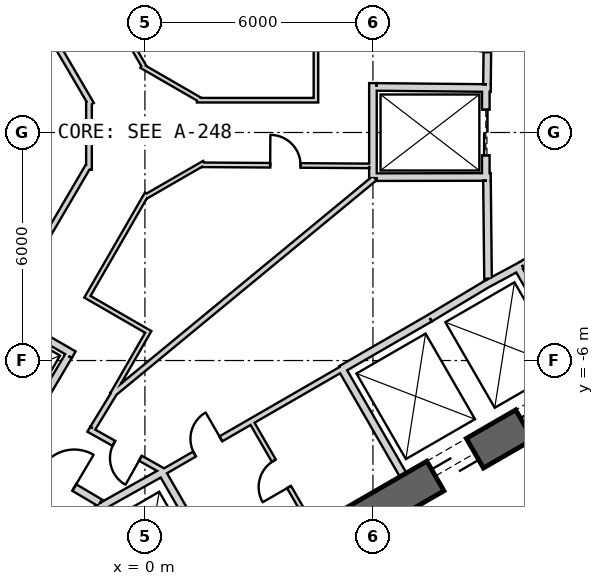
"""IFC4 building model, lengths in metres.
Left out: names, types, materials, properties, quantities, classifications, styles, units other than length and angle.
Written with IfcOpenShell. Run it as: python <this file> out.ifc"""

import sys

from ifc_helpers import new_model, si_unit, direction, frame, frame_2d, origin, place, context, subcontext, project, spatial, rectangle, extrude, element, fill, save


model = new_model("IFC4")
c1 = context("Model", 3, precision=1e-05, world=origin(), true_north=direction((0.0, 1.0)))
c2 = subcontext(c1, "Body", "Model", "MODEL_VIEW")
j1 = project(units=[si_unit("LENGTHUNIT", "METRE"), si_unit("PLANEANGLEUNIT", "RADIAN")], contexts=[c1])
p1 = place(None, origin())
s1 = spatial("IfcSite", under=j1, at=p1, CompositionType="ELEMENT")
p2 = place(p1, origin())
s2 = spatial("IfcBuilding", under=s1, at=p2, CompositionType="ELEMENT")
p3 = place(p2, frame((0.0, 0.0, 398.3)))
s3 = spatial("IfcBuildingStorey", under=s2, at=p3, CompositionType="ELEMENT", Elevation=398.3)
p4 = place(p3, frame((19.475, 2.208, 0.0), z_axis=(0.0, 0.0, 1.0), x_axis=(-0.866028369851, 0.499994862586, 0.0)))
e1 = element("IfcWall", 1, at=p4, inside=s3, PredefinedType="SHEAR", context=c2, shape_type="SweptSolid", body=[
    extrude(rectangle(XDim=31.523, YDim=0.9, at=frame_2d((15.762, 0.0))), origin(), (0.0, 0.0, 1.0), 6.5),
])
p5 = place(p4, frame((3.612, 0.0, 0.0)))
e2 = element("IfcOpeningElement", 2, at=p5, cuts=e1, PredefinedType="OPENING", context=c2, shape_type="SweptSolid", body=[
    extrude(rectangle(XDim=1.2, YDim=2.4, at=frame_2d((0.6, 1.2))), frame((0.0, 0.46, 0.0), z_axis=(0.0, -1.0, 0.0), x_axis=(1.0, 0.0, 0.0)), (0.0, 0.0, 1.0), 0.92),
])
p6 = place(p4, frame((26.712, 0.0, 0.0)))
e3 = element("IfcOpeningElement", 3, at=p6, cuts=e1, PredefinedType="OPENING", context=c2, shape_type="SweptSolid", body=[
    extrude(rectangle(XDim=1.2, YDim=2.4, at=frame_2d((0.6, 1.2))), frame((0.0, 0.46, 0.0), z_axis=(0.0, -1.0, 0.0), x_axis=(1.0, 0.0, 0.0)), (0.0, 0.0, 1.0), 0.92),
])
p7 = place(p3, frame((-7.825, -17.97, 0.0), z_axis=(0.0, 0.0, 1.0), x_axis=(0.866028369851, 0.499994862586, 0.0)))
e4 = element("IfcWall", 4, at=p7, inside=s3, PredefinedType="SHEAR", context=c2, shape_type="SweptSolid", body=[
    extrude(rectangle(XDim=31.523, YDim=0.9, at=frame_2d((15.762, 0.0))), origin(), (0.0, 0.0, 1.0), 6.5),
])
p8 = place(p7, frame((7.062, 0.0, 0.0)))
e5 = element("IfcOpeningElement", 5, at=p8, cuts=e4, PredefinedType="OPENING", context=c2, shape_type="SweptSolid", body=[
    extrude(rectangle(XDim=1.2, YDim=2.4, at=frame_2d((0.6, 1.2))), frame((0.0, 0.46, 0.0), z_axis=(0.0, -1.0, 0.0), x_axis=(1.0, 0.0, 0.0)), (0.0, 0.0, 1.0), 0.92),
])
p9 = place(p7, frame((9.762, 0.0, 0.0)))
e6 = element("IfcOpeningElement", 6, at=p9, cuts=e4, PredefinedType="OPENING", context=c2, shape_type="SweptSolid", body=[
    extrude(rectangle(XDim=1.2, YDim=2.4, at=frame_2d((0.6, 1.2))), frame((0.0, 0.46, 0.0), z_axis=(0.0, -1.0, 0.0), x_axis=(1.0, 0.0, 0.0)), (0.0, 0.0, 1.0), 0.92),
])
p10 = place(p7, frame((17.862, 0.0, 0.0)))
e7 = element("IfcOpeningElement", 7, at=p10, cuts=e4, PredefinedType="OPENING", context=c2, shape_type="SweptSolid", body=[
    extrude(rectangle(XDim=1.2, YDim=2.4, at=frame_2d((0.6, 1.2))), frame((0.0, 0.46, 0.0), z_axis=(0.0, -1.0, 0.0), x_axis=(1.0, 0.0, 0.0)), (0.0, 0.0, 1.0), 0.92),
])
p11 = place(p7, frame((20.562, 0.0, 0.0)))
e8 = element("IfcOpeningElement", 8, at=p11, cuts=e4, PredefinedType="OPENING", context=c2, shape_type="SweptSolid", body=[
    extrude(rectangle(XDim=1.2, YDim=2.4, at=frame_2d((0.6, 1.2))), frame((0.0, 0.46, 0.0), z_axis=(0.0, -1.0, 0.0), x_axis=(1.0, 0.0, 0.0)), (0.0, 0.0, 1.0), 0.92),
])
p12 = place(p7, frame((26.712, 0.0, 0.0)))
e9 = element("IfcOpeningElement", 9, at=p12, cuts=e4, PredefinedType="OPENING", context=c2, shape_type="SweptSolid", body=[
    extrude(rectangle(XDim=1.2, YDim=2.4, at=frame_2d((0.6, 1.2))), frame((0.0, 0.46, 0.0), z_axis=(0.0, -1.0, 0.0), x_axis=(1.0, 0.0, 0.0)), (0.0, 0.0, 1.0), 0.92),
])
p13 = place(p7, frame((3.612, 0.0, 0.0)))
e10 = element("IfcOpeningElement", 10, at=p13, cuts=e4, PredefinedType="OPENING", context=c2, shape_type="SweptSolid", body=[
    extrude(rectangle(XDim=1.2, YDim=2.4, at=frame_2d((0.6, 1.2))), frame((0.0, 0.46, 0.0), z_axis=(0.0, -1.0, 0.0), x_axis=(1.0, 0.0, 0.0)), (0.0, 0.0, 1.0), 0.92),
])
p14 = place(p3, frame((0.442, -8.925, 0.0), z_axis=(0.0, 0.0, 1.0), x_axis=(0.499984717929, -0.866034226713, 0.0)))
e11 = element("IfcWall", 11, at=p14, inside=s3, PredefinedType="PLUMBINGWALL", context=c2, shape_type="SweptSolid", body=[
    extrude(rectangle(XDim=3.25, YDim=0.2, at=frame_2d((1.625, 0.0))), origin(), (0.0, 0.0, 1.0), 6.2),
])
p15 = place(p3, frame((-1.024, -9.771, 0.0), z_axis=(0.0, 0.0, 1.0), x_axis=(-0.850348075135, -0.526220629693, 0.0)))
e12 = element("IfcWall", 12, at=p15, inside=s3, PredefinedType="PLUMBINGWALL", context=c2, shape_type="SweptSolid", body=[
    extrude(rectangle(XDim=0.878, YDim=0.2, at=frame_2d((0.439, 0.0))), origin(), (0.0, 0.0, 1.0), 6.2),
])
p16 = place(p3, frame((-1.13, -9.832, 0.0), z_axis=(0.0, 0.0, 1.0), x_axis=(0.871988740738, 0.489525929882, 0.0)))
e13 = element("IfcWall", 13, at=p16, inside=s3, PredefinedType="PLUMBINGWALL", context=c2, shape_type="SweptSolid", body=[
    extrude(rectangle(XDim=1.845, YDim=0.2, at=frame_2d((0.922, 0.0))), origin(), (0.0, 0.0, 1.0), 6.2),
])
p17 = place(p3, frame((6.795, -9.01, 0.0), z_axis=(0.0, 0.0, 1.0), x_axis=(-0.499984717929, 0.866034226713, 0.0)))
e14 = element("IfcWall", 14, at=p17, inside=s3, PredefinedType="PLUMBINGWALL", context=c2, shape_type="SweptSolid", body=[
    extrude(rectangle(XDim=3.25, YDim=0.2, at=frame_2d((1.625, 0.0))), origin(), (0.0, 0.0, 1.0), 6.2),
])
p18 = place(p3, frame((5.159, -6.236, 0.0), z_axis=(0.0, 0.0, 1.0), x_axis=(0.866036505625, 0.499980770555, 0.0)))
e15 = element("IfcWall", 15, at=p18, inside=s3, PredefinedType="PLUMBINGWALL", context=c2, shape_type="SweptSolid", body=[
    extrude(rectangle(XDim=2.7, YDim=0.2, at=frame_2d((1.35, 0.0))), origin(), (0.0, 0.0, 1.0), 6.2),
])
p19 = place(p3, frame((9.795, -3.525, 0.0), z_axis=(0.0, 0.0, 1.0), x_axis=(0.499984717929, -0.866034226713, 0.0)))
e16 = element("IfcWall", 16, at=p19, inside=s3, PredefinedType="PLUMBINGWALL", context=c2, shape_type="SweptSolid", body=[
    extrude(rectangle(XDim=3.25, YDim=0.2, at=frame_2d((1.625, 0.0))), origin(), (0.0, 0.0, 1.0), 6.2),
])
p20 = place(p3, frame((8.974, -3.999, 0.0), z_axis=(0.0, 0.0, 1.0), x_axis=(0.880907015104, 0.473289373154, 0.0)))
e17 = element("IfcWall", 17, at=p20, inside=s3, PredefinedType="PLUMBINGWALL", context=c2, shape_type="SweptSolid", body=[
    extrude(rectangle(XDim=1.078, YDim=0.2, at=frame_2d((0.539, 0.0))), origin(), (0.0, 0.0, 1.0), 6.2),
])
p21 = place(p3, frame((7.497, -4.886, 0.0), z_axis=(0.0, 0.0, 1.0), x_axis=(0.857516281273, 0.51445682749, 0.0)))
e18 = element("IfcWall", 18, at=p21, inside=s3, PredefinedType="PLUMBINGWALL", context=c2, shape_type="SweptSolid", body=[
    extrude(rectangle(XDim=1.845, YDim=0.2, at=frame_2d((0.922, 0.0))), origin(), (0.0, 0.0, 1.0), 6.2),
])
p22 = place(p3, frame((8.97, 1.2, 0.0), z_axis=(0.0, 0.0, 1.0), x_axis=(0.0, -1.0, 0.0)))
e19 = element("IfcWall", 19, at=p22, inside=s3, PredefinedType="PLUMBINGWALL", context=c2, shape_type="SweptSolid", body=[
    extrude(rectangle(XDim=2.4, YDim=0.2, at=frame_2d((1.2, 0.0))), origin(), (0.0, 0.0, 1.0), 6.2),
])
p23 = place(p22, frame((0.6, 0.0, 0.0)))
e20 = element("IfcOpeningElement", 20, at=p23, cuts=e19, PredefinedType="OPENING", context=c2, shape_type="SweptSolid", body=[
    extrude(rectangle(XDim=1.2, YDim=2.4, at=frame_2d((0.6, 1.2))), frame((0.0, 0.11, 0.0), z_axis=(0.0, -1.0, 0.0), x_axis=(1.0, 0.0, 0.0)), (0.0, 0.0, 1.0), 0.22),
])
p24 = place(p3, frame((9.1, -1.17, 0.0), z_axis=(0.0, 0.0, 1.0), x_axis=(-0.999998675455, -0.001627602011, 0.0)))
e21 = element("IfcWall", 21, at=p24, inside=s3, PredefinedType="PLUMBINGWALL", context=c2, shape_type="SweptSolid", body=[
    extrude(rectangle(XDim=3.0, YDim=0.2, at=frame_2d((1.5, 0.0))), origin(), (0.0, 0.0, 1.0), 6.2),
])
p25 = place(p3, frame((6.0, -1.2, 0.0), z_axis=(0.0, 0.0, 1.0), x_axis=(0.0, 1.0, 0.0)))
e22 = element("IfcWall", 22, at=p25, inside=s3, PredefinedType="PLUMBINGWALL", context=c2, shape_type="SweptSolid", body=[
    extrude(rectangle(XDim=2.5, YDim=0.2, at=frame_2d((1.25, 0.0))), origin(), (0.0, 0.0, 1.0), 6.2),
])
p26 = place(p3, frame((9.1, 1.169, 0.0), z_axis=(0.0, 0.0, 1.0), x_axis=(-0.99994990606, 0.010009264196, 0.0)))
e23 = element("IfcWall", 23, at=p26, inside=s3, PredefinedType="PLUMBINGWALL", context=c2, shape_type="SweptSolid", body=[
    extrude(rectangle(XDim=3.0, YDim=0.2, at=frame_2d((1.5, 0.0))), origin(), (0.0, 0.0, 1.0), 6.2),
])
p27 = place(p3, frame((-3.953, -4.646, 0.0), z_axis=(0.0, 0.0, 1.0), x_axis=(0.866024647952, -0.500001309137, 0.0)))
e24 = element("IfcWall", 24, at=p27, inside=s3, PredefinedType="PLUMBINGWALL", context=c2, shape_type="SweptSolid", body=[
    extrude(rectangle(XDim=2.4, YDim=0.2, at=frame_2d((1.2, 0.0))), origin(), (0.0, 0.0, 1.0), 6.2),
])
p28 = place(p3, frame((-2.012, -5.882, 0.0), z_axis=(0.0, 0.0, 1.0), x_axis=(-0.508619639323, -0.860991325447, 0.0)))
e25 = element("IfcWall", 25, at=p28, inside=s3, PredefinedType="PLUMBINGWALL", context=c2, shape_type="SweptSolid", body=[
    extrude(rectangle(XDim=3.0, YDim=0.2, at=frame_2d((1.5, 0.0))), origin(), (0.0, 0.0, 1.0), 6.2),
])
p29 = place(p3, frame((4.405, -10.389, 0.0), z_axis=(0.0, 0.0, 1.0), x_axis=(-0.500017246033, 0.866015446554, 0.0)))
e26 = element("IfcWall", 26, at=p29, inside=s3, PredefinedType="PARTITIONING", context=c2, shape_type="SweptSolid", body=[
    extrude(rectangle(XDim=3.25, YDim=0.12, at=frame_2d((1.625, 0.0))), origin(), (0.0, 0.0, 1.0), 6.2),
])
p30 = place(p29, frame((1.225, 0.0, 0.0)))
e27 = element("IfcOpeningElement", 27, at=p30, cuts=e26, PredefinedType="OPENING", context=c2, shape_type="SweptSolid", body=[
    extrude(rectangle(XDim=0.8, YDim=2.1, at=frame_2d((0.4, 1.05))), frame((0.0, 0.07, 0.0), z_axis=(0.0, -1.0, 0.0), x_axis=(1.0, 0.0, 0.0)), (0.0, 0.0, 1.0), 0.14),
])
p31 = place(p3, frame((0.483, -8.936, 0.0), z_axis=(0.0, 0.0, 1.0), x_axis=(0.866028230842, 0.499995103361, 0.0)))
e28 = element("IfcWall", 28, at=p31, inside=s3, PredefinedType="PLUMBINGWALL", context=c2, shape_type="SweptSolid", body=[
    extrude(rectangle(XDim=5.4, YDim=0.15, at=frame_2d((2.7, 0.0))), origin(), (0.0, 0.0, 1.0), 6.2),
])
p32 = place(p31, frame((0.95, 0.0, 0.0)))
e29 = element("IfcOpeningElement", 29, at=p32, cuts=e28, PredefinedType="OPENING", context=c2, shape_type="SweptSolid", body=[
    extrude(rectangle(XDim=0.8, YDim=2.1, at=frame_2d((0.4, 1.05))), frame((0.0, 0.085, 0.0), z_axis=(0.0, -1.0, 0.0), x_axis=(1.0, 0.0, 0.0)), (0.0, 0.0, 1.0), 0.17),
])
p33 = place(p3, frame((12.245, -2.109, 0.0), z_axis=(0.0, 0.0, 1.0), x_axis=(-0.860414880418, -0.509594185166, 0.0)))
e30 = element("IfcWall", 30, at=p33, inside=s3, PredefinedType="PARTITIONING", context=c2, shape_type="SweptSolid", body=[
    extrude(rectangle(XDim=2.7, YDim=0.2, at=frame_2d((1.35, 0.0))), origin(), (0.0, 0.0, 1.0), 6.2),
])
p34 = place(p3, frame((9.029, -3.851, 0.0), z_axis=(0.0, 0.0, 1.0), x_axis=(-0.010784614026, 0.999941844359, 0.0)))
e31 = element("IfcWall", 31, at=p34, inside=s3, PredefinedType="PARTITIONING", context=c2, shape_type="SweptSolid", body=[
    extrude(rectangle(XDim=2.581, YDim=0.2, at=frame_2d((1.291, 0.0))), origin(), (0.0, 0.0, 1.0), 6.2),
])
p35 = place(p3, frame((9.001, 1.27, 0.0), z_axis=(0.0, 0.0, 1.0), x_axis=(0.010723968736, 0.999942496594, 0.0)))
e32 = element("IfcWall", 32, at=p35, inside=s3, PredefinedType="PARTITIONING", context=c2, shape_type="SweptSolid", body=[
    extrude(rectangle(XDim=2.709, YDim=0.2, at=frame_2d((1.354, 0.0))), origin(), (0.0, 0.0, 1.0), 6.2),
])
p36 = place(p35, frame((0.848, 0.0, 0.0)))
e33 = element("IfcOpeningElement", 33, at=p36, cuts=e32, PredefinedType="OPENING", context=c2, shape_type="SweptSolid", body=[
    extrude(rectangle(XDim=1.0, YDim=2.1, at=frame_2d((0.5, 1.05))), frame((0.0, 0.11, 0.0), z_axis=(0.0, -1.0, 0.0), x_axis=(1.0, 0.0, 0.0)), (0.0, 0.0, 1.0), 0.22),
])
p37 = place(p3, frame((-3.401, -8.43, 0.0), z_axis=(0.0, 0.0, 1.0), x_axis=(0.860598681535, -0.509283721849, 0.0)))
e34 = element("IfcWall", 34, at=p37, inside=s3, PredefinedType="PARTITIONING", context=c2, shape_type="SweptSolid", body=[
    extrude(rectangle(XDim=2.581, YDim=0.2, at=frame_2d((1.291, 0.0))), origin(), (0.0, 0.0, 1.0), 6.2),
])
p38 = place(p37, frame((0.791, 0.0, 0.0)))
e35 = element("IfcOpeningElement", 35, at=p38, cuts=e34, PredefinedType="OPENING", context=c2, shape_type="SweptSolid", body=[
    extrude(rectangle(XDim=1.0, YDim=2.1, at=frame_2d((0.5, 1.05))), frame((0.0, 0.11, 0.0), z_axis=(0.0, -1.0, 0.0), x_axis=(1.0, 0.0, 0.0)), (0.0, 0.0, 1.0), 0.22),
])
p39 = place(p3, frame((-1.407, 0.74, 0.0), z_axis=(0.0, 0.0, 1.0), x_axis=(-0.505642484845, 0.862743112125, 0.0)))
e36 = element("IfcWall", 36, at=p39, inside=s3, PredefinedType="PLUMBINGWALL", context=c2, shape_type="SweptSolid", body=[
    extrude(rectangle(XDim=4.556, YDim=0.15, at=frame_2d((2.278, 0.0))), origin(), (0.0, 0.0, 1.0), 6.2),
])
p40 = place(p39, frame((1.942, 0.0, 0.0)))
e37 = element("IfcOpeningElement", 37, at=p40, cuts=e36, PredefinedType="OPENING", context=c2, shape_type="SweptSolid", body=[
    extrude(rectangle(XDim=0.8, YDim=2.1, at=frame_2d((0.4, 1.05))), frame((0.0, 0.085, 0.0), z_axis=(0.0, -1.0, 0.0), x_axis=(1.0, 0.0, 0.0)), (0.0, 0.0, 1.0), 0.17),
])
p41 = place(p3, frame((-1.472, -0.978, 0.0), z_axis=(0.0, 0.0, 1.0), x_axis=(0.0, 1.0, 0.0)))
e38 = element("IfcWall", 38, at=p41, inside=s3, PredefinedType="PLUMBINGWALL", context=c2, shape_type="SweptSolid", body=[
    extrude(rectangle(XDim=1.804, YDim=0.15, at=frame_2d((0.902, 0.0))), origin(), (0.0, 0.0, 1.0), 6.2),
])
p42 = place(p3, frame((-3.711, -4.67, 0.0), z_axis=(0.0, 0.0, 1.0), x_axis=(0.505648368764, 0.86273966361, 0.0)))
e39 = element("IfcWall", 39, at=p42, inside=s3, PredefinedType="PLUMBINGWALL", context=c2, shape_type="SweptSolid", body=[
    extrude(rectangle(XDim=4.404, YDim=0.15, at=frame_2d((2.202, 0.0))), origin(), (0.0, 0.0, 1.0), 6.2),
])
p43 = place(p3, frame((6.046, -1.2, 0.0), z_axis=(0.0, 0.0, 1.0), x_axis=(-0.771489624803, -0.636241902755, 0.0)))
e40 = element("IfcWall", 40, at=p43, inside=s3, PredefinedType="PLUMBINGWALL", context=c2, shape_type="SweptSolid", body=[
    extrude(rectangle(XDim=8.961, YDim=0.15, at=frame_2d((4.48, 0.0))), origin(), (0.0, 0.0, 1.0), 6.2),
])
p44 = place(p3, frame((-1.477, -7.808, 0.0), z_axis=(0.0, 0.0, 1.0), x_axis=(0.871822901869, -0.48982122022, 0.0)))
e41 = element("IfcWall", 41, at=p44, inside=s3, PredefinedType="PLUMBINGWALL", context=c2, shape_type="SweptSolid", body=[
    extrude(rectangle(XDim=2.24, YDim=0.15, at=frame_2d((1.12, 0.0))), origin(), (0.0, 0.0, 1.0), 6.2),
])
p45 = place(p44, frame((0.757, 0.0, 0.0)))
e42 = element("IfcOpeningElement", 42, at=p45, cuts=e41, PredefinedType="OPENING", context=c2, shape_type="SweptSolid", body=[
    extrude(rectangle(XDim=0.8, YDim=2.1, at=frame_2d((0.4, 1.05))), frame((0.0, 0.085, 0.0), z_axis=(0.0, -1.0, 0.0), x_axis=(1.0, 0.0, 0.0)), (0.0, 0.0, 1.0), 0.17),
])
p46 = place(p3, frame((-0.787, -6.821, 0.0), z_axis=(0.0, 0.0, 1.0), x_axis=(-0.520993333897, -0.853560745369, 0.0)))
e43 = element("IfcWall", 43, at=p46, inside=s3, PredefinedType="PLUMBINGWALL", context=c2, shape_type="SweptSolid", body=[
    extrude(rectangle(XDim=1.125, YDim=0.15, at=frame_2d((0.562, 0.0))), origin(), (0.0, 0.0, 1.0), 6.2),
])
p47 = place(p3, frame((0.118, -5.195, 0.0), z_axis=(0.0, 0.0, 1.0), x_axis=(-0.499969367985, -0.866043088465, 0.0)))
e44 = element("IfcWall", 44, at=p47, inside=s3, PredefinedType="PARTITIONING", context=c2, shape_type="SweptSolid", body=[
    extrude(rectangle(XDim=1.94, YDim=0.12, at=frame_2d((0.97, 0.0))), origin(), (0.0, 0.0, 1.0), 6.2),
])
p48 = place(p3, frame((-1.566, -4.292, 0.0), z_axis=(0.0, 0.0, 1.0), x_axis=(0.866091100096, -0.499886193382, 0.0)))
e45 = element("IfcWall", 45, at=p48, inside=s3, PredefinedType="PARTITIONING", context=c2, shape_type="SweptSolid", body=[
    extrude(rectangle(XDim=1.85, YDim=0.12, at=frame_2d((0.925, 0.0))), origin(), (0.0, 0.0, 1.0), 6.2),
])
p49 = place(p3, frame((0.052, -1.61, 0.0), z_axis=(0.0, 0.0, 1.0), x_axis=(-0.500011413361, -0.866018814177, 0.0)))
e46 = element("IfcWall", 46, at=p49, inside=s3, PredefinedType="PARTITIONING", context=c2, shape_type="SweptSolid", body=[
    extrude(rectangle(XDim=3.072, YDim=0.12, at=frame_2d((1.536, 0.0))), origin(), (0.0, 0.0, 1.0), 6.2),
])
p50 = place(p3, frame((1.561, -0.799, 0.0), z_axis=(0.0, 0.0, 1.0), x_axis=(-0.866019189511, -0.500010763282, 0.0)))
e47 = element("IfcWall", 47, at=p50, inside=s3, PredefinedType="PARTITIONING", context=c2, shape_type="SweptSolid", body=[
    extrude(rectangle(XDim=1.784, YDim=0.12, at=frame_2d((0.892, 0.0))), origin(), (0.0, 0.0, 1.0), 6.2),
])
p51 = place(p3, frame((5.9, -0.879, 0.0), z_axis=(0.0, 0.0, 1.0), x_axis=(-0.999978650839, 0.006534360439, 0.0)))
e48 = element("IfcWall", 48, at=p51, inside=s3, PredefinedType="PARTITIONING", context=c2, shape_type="SweptSolid", body=[
    extrude(rectangle(XDim=4.409, YDim=0.12, at=frame_2d((2.204, 0.0))), origin(), (0.0, 0.0, 1.0), 6.2),
])
p52 = place(p51, frame((1.804, 0.0, 0.0)))
e49 = element("IfcOpeningElement", 49, at=p52, cuts=e48, PredefinedType="OPENING", context=c2, shape_type="SweptSolid", body=[
    extrude(rectangle(XDim=0.8, YDim=2.1, at=frame_2d((0.4, 1.05))), frame((0.0, 0.07, 0.0), z_axis=(0.0, -1.0, 0.0), x_axis=(1.0, 0.0, 0.0)), (0.0, 0.0, 1.0), 0.14),
])
p53 = place(p3, frame((4.5, 0.79, 0.0), z_axis=(0.0, 0.0, 1.0), x_axis=(0.0, 1.0, 0.0)))
e50 = element("IfcWall", 50, at=p53, inside=s3, PredefinedType="PARTITIONING", context=c2, shape_type="SweptSolid", body=[
    extrude(rectangle(XDim=1.85, YDim=0.12, at=frame_2d((0.925, 0.0))), origin(), (0.0, 0.0, 1.0), 6.2),
])
p54 = place(p3, frame((1.368, 0.85, 0.0), z_axis=(0.0, 0.0, 1.0), x_axis=(1.0, 0.0, 0.0)))
e51 = element("IfcWall", 51, at=p54, inside=s3, PredefinedType="PARTITIONING", context=c2, shape_type="SweptSolid", body=[
    extrude(rectangle(XDim=3.072, YDim=0.12, at=frame_2d((1.536, 0.0))), origin(), (0.0, 0.0, 1.0), 6.2),
])
p55 = place(p3, frame((-0.09, 1.752, 0.0), z_axis=(0.0, 0.0, 1.0), x_axis=(0.866046676307, -0.4999631531, 0.0)))
e52 = element("IfcWall", 52, at=p55, inside=s3, PredefinedType="PARTITIONING", context=c2, shape_type="SweptSolid", body=[
    extrude(rectangle(XDim=1.785, YDim=0.12, at=frame_2d((0.893, 0.0))), origin(), (0.0, 0.0, 1.0), 6.2),
])
p56 = place(p3, frame((-1.544, 4.374, 0.0), z_axis=(0.0, 0.0, 1.0), x_axis=(0.500023124857, -0.86601205223, 0.0)))
e53 = element("IfcWall", 53, at=p56, inside=s3, PredefinedType="PARTITIONING", context=c2, shape_type="SweptSolid", body=[
    extrude(rectangle(XDim=3.069, YDim=0.12, at=frame_2d((1.535, 0.0))), origin(), (0.0, 0.0, 1.0), 6.2),
])
p57 = place(p56, frame((1.165, 0.0, 0.0)))
e54 = element("IfcOpeningElement", 54, at=p57, cuts=e53, PredefinedType="OPENING", context=c2, shape_type="SweptSolid", body=[
    extrude(rectangle(XDim=0.8, YDim=2.1, at=frame_2d((0.4, 1.05))), frame((0.0, 0.07, 0.0), z_axis=(0.0, -1.0, 0.0), x_axis=(1.0, 0.0, 0.0)), (0.0, 0.0, 1.0), 0.14),
])
p58 = place(p3, frame((1.009, -16.391, 0.0), z_axis=(0.0, 0.0, 1.0), x_axis=(0.866026744585, 0.499997677658, 0.0)))
e55 = element("IfcWall", 55, at=p58, inside=s3, PredefinedType="PARTITIONING", context=c2, shape_type="SweptSolid", body=[
    extrude(rectangle(XDim=13.617, YDim=0.2, at=frame_2d((6.808, 0.0))), origin(), (0.0, 0.0, 1.0), 5.67),
])
p59 = place(p58, frame((6.456, 0.0, 0.0)))
e56 = element("IfcOpeningElement", 56, at=p59, cuts=e55, PredefinedType="OPENING", context=c2, shape_type="SweptSolid", body=[
    extrude(rectangle(XDim=1.0, YDim=2.1, at=frame_2d((0.5, 1.05))), frame((0.0, 0.11, 0.0), z_axis=(0.0, -1.0, 0.0), x_axis=(1.0, 0.0, 0.0)), (0.0, 0.0, 1.0), 0.22),
])
p60 = place(p23, origin())
e57 = element("IfcDoor", 57, at=p60, inside=s3, OperationType="SLIDING_TO_LEFT", PredefinedType="USERDEFINED", context=c2, shape_type="SweptSolid", body=[
    extrude(rectangle(XDim=1.2, YDim=2.4, at=frame_2d((0.6, 1.2))), frame((0.0, 0.025, 0.0), z_axis=(0.0, -1.0, 0.0), x_axis=(1.0, 0.0, 0.0)), (0.0, 0.0, 1.0), 0.05),
])
fill(e20, e57)
p61 = place(p38, origin())
e58 = element("IfcDoor", 58, at=p61, inside=s3, OperationType="SINGLE_SWING_RIGHT", PredefinedType="USERDEFINED", context=c2, shape_type="SweptSolid", body=[
    extrude(rectangle(XDim=1.0, YDim=2.1, at=frame_2d((0.5, 1.05))), frame((0.0, 0.025, 0.0), z_axis=(0.0, -1.0, 0.0), x_axis=(1.0, 0.0, 0.0)), (0.0, 0.0, 1.0), 0.05),
])
fill(e35, e58)
p62 = place(p45, origin())
e59 = element("IfcDoor", 59, at=p62, inside=s3, OperationType="SINGLE_SWING_RIGHT", PredefinedType="USERDEFINED", context=c2, shape_type="SweptSolid", body=[
    extrude(rectangle(XDim=0.8, YDim=2.1, at=frame_2d((0.4, 1.05))), frame((0.0, 0.025, 0.0), z_axis=(0.0, -1.0, 0.0), x_axis=(1.0, 0.0, 0.0)), (0.0, 0.0, 1.0), 0.05),
])
fill(e42, e59)
p63 = place(p52, origin())
e60 = element("IfcDoor", 60, at=p63, inside=s3, OperationType="SINGLE_SWING_RIGHT", PredefinedType="USERDEFINED", context=c2, shape_type="SweptSolid", body=[
    extrude(rectangle(XDim=0.8, YDim=2.1, at=frame_2d((0.4, 1.05))), frame((0.0, 0.025, 0.0), z_axis=(0.0, -1.0, 0.0), x_axis=(1.0, 0.0, 0.0)), (0.0, 0.0, 1.0), 0.05),
])
fill(e49, e60)
p64 = place(p30, origin())
e61 = element("IfcDoor", 61, at=p64, inside=s3, OperationType="SINGLE_SWING_LEFT", PredefinedType="USERDEFINED", context=c2, shape_type="SweptSolid", body=[
    extrude(rectangle(XDim=0.8, YDim=2.1, at=frame_2d((0.4, 1.05))), frame((0.0, 0.025, 0.0), z_axis=(0.0, -1.0, 0.0), x_axis=(1.0, 0.0, 0.0)), (0.0, 0.0, 1.0), 0.05),
])
fill(e27, e61)
p65 = place(p32, origin())
e62 = element("IfcDoor", 62, at=p65, inside=s3, OperationType="SINGLE_SWING_RIGHT", PredefinedType="USERDEFINED", context=c2, shape_type="SweptSolid", body=[
    extrude(rectangle(XDim=0.8, YDim=2.1, at=frame_2d((0.4, 1.05))), frame((0.0, 0.025, 0.0), z_axis=(0.0, -1.0, 0.0), x_axis=(1.0, 0.0, 0.0)), (0.0, 0.0, 1.0), 0.05),
])
fill(e29, e62)
p66 = place(p10, origin())
e63 = element("IfcDoor", 63, at=p66, inside=s3, OperationType="SLIDING_TO_LEFT", PredefinedType="USERDEFINED", context=c2, shape_type="SweptSolid", body=[
    extrude(rectangle(XDim=1.2, YDim=2.4, at=frame_2d((0.6, 1.2))), frame((0.0, 0.025, 0.0), z_axis=(0.0, -1.0, 0.0), x_axis=(1.0, 0.0, 0.0)), (0.0, 0.0, 1.0), 0.05),
])
fill(e7, e63)
p67 = place(p11, origin())
e64 = element("IfcDoor", 64, at=p67, inside=s3, OperationType="SLIDING_TO_LEFT", PredefinedType="USERDEFINED", context=c2, shape_type="SweptSolid", body=[
    extrude(rectangle(XDim=1.2, YDim=2.4, at=frame_2d((0.6, 1.2))), frame((0.0, 0.025, 0.0), z_axis=(0.0, -1.0, 0.0), x_axis=(1.0, 0.0, 0.0)), (0.0, 0.0, 1.0), 0.05),
])
fill(e8, e64)
save(model, sys.argv[1])
